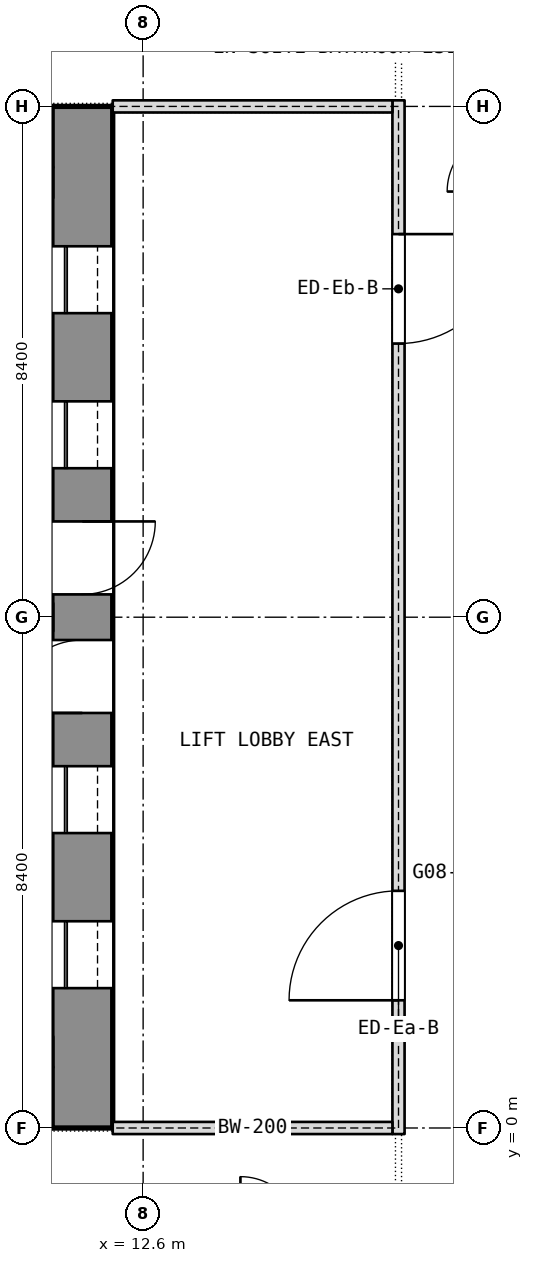
"""IFC4 building model, lengths in metres.
Left out: names, types, materials, properties, quantities, classifications, styles, units other than length and angle.
Written with IfcOpenShell. Run it as: python <this file> out.ifc"""

import sys

from ifc_helpers import new_model, si_unit, direction, frame, frame_2d, origin, place, context, subcontext, project, spatial, rectangle, extrude, element, fill, save


model = new_model("IFC4")
c1 = context("Model", 3, precision=1e-05, world=origin(), true_north=direction((0.0, 1.0)))
c2 = subcontext(c1, "Body", "Model", "MODEL_VIEW")
j1 = project(units=[si_unit("LENGTHUNIT", "METRE"), si_unit("PLANEANGLEUNIT", "RADIAN")], contexts=[c1])
p1 = place(None, origin())
s1 = spatial("IfcSite", under=j1, at=p1, CompositionType="ELEMENT")
p2 = place(p1, origin())
s2 = spatial("IfcBuilding", under=s1, at=p2, CompositionType="ELEMENT")
p3 = place(p2, frame((0.0, 0.0, 108.5)))
s3 = spatial("IfcBuildingStorey", under=s2, at=p3, CompositionType="ELEMENT", Elevation=108.5)
p4 = place(p3, frame((11.6, 0.0, 0.0), z_axis=(0.0, 0.0, 1.0), x_axis=(0.0, 1.0, 0.0)))
e1 = element("IfcWall", 1, at=p4, inside=s3, PredefinedType="SHEAR", context=c2, shape_type="SweptSolid", body=[
    extrude(rectangle(XDim=16.8, YDim=1.0, at=frame_2d((8.4, 0.0))), origin(), (0.0, 0.0, 1.0), 3.6),
])
p5 = place(p4, frame((2.3, 0.0, 0.0)))
e2 = element("IfcOpeningElement", 2, at=p5, cuts=e1, PredefinedType="OPENING", context=c2, shape_type="SweptSolid", body=[
    extrude(rectangle(XDim=1.1, YDim=2.1, at=frame_2d((0.55, 1.05))), frame((0.0, 0.5, 0.0), z_axis=(0.0, -1.0, 0.0), x_axis=(1.0, 0.0, 0.0)), (0.0, 0.0, 1.0), 1.0),
])
p6 = place(p4, frame((4.85, 0.0, 0.0)))
e3 = element("IfcOpeningElement", 3, at=p6, cuts=e1, PredefinedType="OPENING", context=c2, shape_type="SweptSolid", body=[
    extrude(rectangle(XDim=1.1, YDim=2.1, at=frame_2d((0.55, 1.05))), frame((0.0, 0.5, 0.0), z_axis=(0.0, -1.0, 0.0), x_axis=(1.0, 0.0, 0.0)), (0.0, 0.0, 1.0), 1.0),
])
p7 = place(p4, frame((6.825, 0.0, 0.0)))
e4 = element("IfcOpeningElement", 4, at=p7, cuts=e1, PredefinedType="OPENING", context=c2, shape_type="SweptSolid", body=[
    extrude(rectangle(XDim=1.2, YDim=2.1, at=frame_2d((0.6, 1.05))), frame((0.0, 0.5, 0.0), z_axis=(0.0, -1.0, 0.0), x_axis=(1.0, 0.0, 0.0)), (0.0, 0.0, 1.0), 1.0),
])
p8 = place(p4, frame((13.4, 0.0, 0.0)))
e5 = element("IfcOpeningElement", 5, at=p8, cuts=e1, PredefinedType="OPENING", context=c2, shape_type="SweptSolid", body=[
    extrude(rectangle(XDim=1.1, YDim=2.1, at=frame_2d((0.55, 1.05))), frame((0.0, 0.5, 0.0), z_axis=(0.0, -1.0, 0.0), x_axis=(1.0, 0.0, 0.0)), (0.0, 0.0, 1.0), 1.0),
])
p9 = place(p4, frame((10.85, 0.0, 0.0)))
e6 = element("IfcOpeningElement", 6, at=p9, cuts=e1, PredefinedType="OPENING", context=c2, shape_type="SweptSolid", body=[
    extrude(rectangle(XDim=1.1, YDim=2.1, at=frame_2d((0.55, 1.05))), frame((0.0, 0.5, 0.0), z_axis=(0.0, -1.0, 0.0), x_axis=(1.0, 0.0, 0.0)), (0.0, 0.0, 1.0), 1.0),
])
p10 = place(p4, frame((8.775, 0.0, 0.0)))
e7 = element("IfcOpeningElement", 7, at=p10, cuts=e1, PredefinedType="OPENING", context=c2, shape_type="SweptSolid", body=[
    extrude(rectangle(XDim=1.2, YDim=2.1, at=frame_2d((0.6, 1.05))), frame((0.0, 0.5, 0.0), z_axis=(0.0, -1.0, 0.0), x_axis=(1.0, 0.0, 0.0)), (0.0, 0.0, 1.0), 1.0),
])
p11 = place(p3, frame((16.8, -0.1, 0.0), z_axis=(0.0, 0.0, 1.0), x_axis=(0.0, 1.0, 0.0)))
e8 = element("IfcWall", 8, at=p11, inside=s3, PredefinedType="PARTITIONING", context=c2, shape_type="SweptSolid", body=[
    extrude(rectangle(XDim=17.0, YDim=0.2, at=frame_2d((8.5, 0.0))), origin(), (0.0, 0.0, 1.0), 3.34),
])
p12 = place(p11, frame((2.2, 0.0, 0.0)))
e9 = element("IfcOpeningElement", 9, at=p12, cuts=e8, PredefinedType="OPENING", context=c2, shape_type="SweptSolid", body=[
    extrude(rectangle(XDim=1.8, YDim=2.1, at=frame_2d((0.9, 1.05))), frame((0.0, 0.1, 0.0), z_axis=(0.0, -1.0, 0.0), x_axis=(1.0, 0.0, 0.0)), (0.0, 0.0, 1.0), 0.2),
])
p13 = place(p11, frame((13.0, 0.0, 0.0)))
e10 = element("IfcOpeningElement", 10, at=p13, cuts=e8, PredefinedType="OPENING", context=c2, shape_type="SweptSolid", body=[
    extrude(rectangle(XDim=1.8, YDim=2.1, at=frame_2d((0.9, 1.05))), frame((0.0, 0.1, 0.0), z_axis=(0.0, -1.0, 0.0), x_axis=(1.0, 0.0, 0.0)), (0.0, 0.0, 1.0), 0.2),
])
for number, where, z_axis, x_axis in (
    (11, (12.1, 0.0, 0.0), (0.0, 0.0, 1.0), (1.0, 0.0, 0.0)),
    (12, (12.1, 16.8, 0.0), (0.0, 0.0, 1.0), (1.0, 0.0, 0.0)),
):
    element("IfcWall", number, at=place(p3, frame(where, z_axis=z_axis, x_axis=x_axis)), inside=s3, PredefinedType="PARTITIONING", context=c2, shape_type="SweptSolid", body=[
        extrude(rectangle(XDim=4.6, YDim=0.2, at=frame_2d((2.3, 0.0))), origin(), (0.0, 0.0, 1.0), 2.89),
    ])
p14 = place(p5, origin())
e13 = element("IfcDoor", 13, at=p14, inside=s3, OperationType="SLIDING_TO_LEFT", PredefinedType="DOOR", context=c2, shape_type="SweptSolid", body=[
    extrude(rectangle(XDim=1.1, YDim=2.1, at=frame_2d((0.55, 1.05))), frame((0.0, 0.025, 0.0), z_axis=(0.0, -1.0, 0.0), x_axis=(1.0, 0.0, 0.0)), (0.0, 0.0, 1.0), 0.05),
])
fill(e2, e13)
p15 = place(p6, origin())
e14 = element("IfcDoor", 14, at=p15, inside=s3, OperationType="SLIDING_TO_LEFT", PredefinedType="DOOR", context=c2, shape_type="SweptSolid", body=[
    extrude(rectangle(XDim=1.1, YDim=2.1, at=frame_2d((0.55, 1.05))), frame((0.0, 0.025, 0.0), z_axis=(0.0, -1.0, 0.0), x_axis=(1.0, 0.0, 0.0)), (0.0, 0.0, 1.0), 0.05),
])
fill(e3, e14)
p16 = place(p7, origin())
e15 = element("IfcDoor", 15, at=p16, inside=s3, OperationType="SINGLE_SWING_LEFT", PredefinedType="DOOR", context=c2, shape_type="SweptSolid", body=[
    extrude(rectangle(XDim=1.2, YDim=2.1, at=frame_2d((0.6, 1.05))), frame((0.0, 0.025, 0.0), z_axis=(0.0, -1.0, 0.0), x_axis=(1.0, 0.0, 0.0)), (0.0, 0.0, 1.0), 0.05),
])
fill(e4, e15)
p17 = place(p8, origin())
e16 = element("IfcDoor", 16, at=p17, inside=s3, OperationType="SLIDING_TO_LEFT", PredefinedType="DOOR", context=c2, shape_type="SweptSolid", body=[
    extrude(rectangle(XDim=1.1, YDim=2.1, at=frame_2d((0.55, 1.05))), frame((0.0, 0.025, 0.0), z_axis=(0.0, -1.0, 0.0), x_axis=(1.0, 0.0, 0.0)), (0.0, 0.0, 1.0), 0.05),
])
fill(e5, e16)
p18 = place(p9, origin())
e17 = element("IfcDoor", 17, at=p18, inside=s3, OperationType="SLIDING_TO_LEFT", PredefinedType="DOOR", context=c2, shape_type="SweptSolid", body=[
    extrude(rectangle(XDim=1.1, YDim=2.1, at=frame_2d((0.55, 1.05))), frame((0.0, 0.025, 0.0), z_axis=(0.0, -1.0, 0.0), x_axis=(1.0, 0.0, 0.0)), (0.0, 0.0, 1.0), 0.05),
])
fill(e6, e17)
p19 = place(p10, origin())
e18 = element("IfcDoor", 18, at=p19, inside=s3, OperationType="SINGLE_SWING_LEFT", PredefinedType="DOOR", context=c2, shape_type="SweptSolid", body=[
    extrude(rectangle(XDim=1.2, YDim=2.1, at=frame_2d((0.6, 1.05))), frame((0.0, 0.025, 0.0), z_axis=(0.0, -1.0, 0.0), x_axis=(1.0, 0.0, 0.0)), (0.0, 0.0, 1.0), 0.05),
])
fill(e7, e18)
p20 = place(p12, origin())
e19 = element("IfcDoor", 19, at=p20, inside=s3, OperationType="DOUBLE_DOOR_SINGLE_SWING", PredefinedType="DOOR", context=c2, shape_type="SweptSolid", body=[
    extrude(rectangle(XDim=1.8, YDim=2.1, at=frame_2d((0.9, 1.05))), frame((0.0, 0.025, 0.0), z_axis=(0.0, -1.0, 0.0), x_axis=(1.0, 0.0, 0.0)), (0.0, 0.0, 1.0), 0.05),
])
fill(e9, e19)
p21 = place(p13, origin())
e20 = element("IfcDoor", 20, at=p21, inside=s3, OperationType="DOUBLE_DOOR_SINGLE_SWING", PredefinedType="DOOR", context=c2, shape_type="SweptSolid", body=[
    extrude(rectangle(XDim=1.8, YDim=2.1, at=frame_2d((0.9, 1.05))), frame((0.0, 0.025, 0.0), z_axis=(0.0, -1.0, 0.0), x_axis=(1.0, 0.0, 0.0)), (0.0, 0.0, 1.0), 0.05),
])
fill(e10, e20)
save(model, sys.argv[1])
